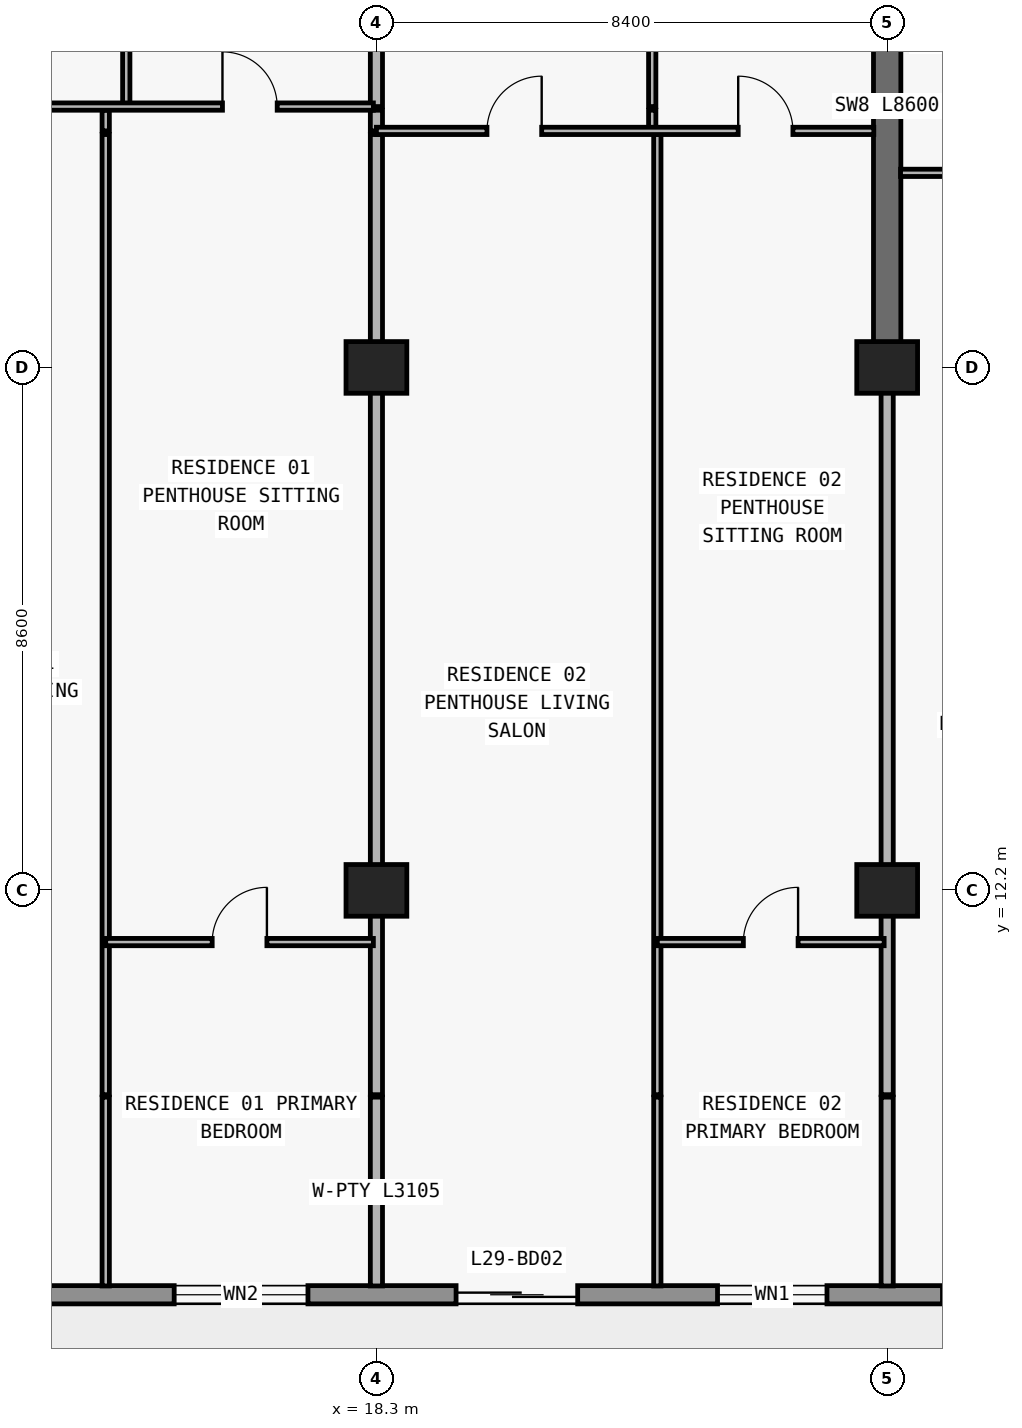
"""IFC4 building model, lengths in metres.
Left out: names, types, materials, properties, quantities, classifications, styles, units other than length and angle.
Written with IfcOpenShell. Run it as: python <this file> out.ifc"""

import sys

from ifc_helpers import new_model, si_unit, direction, frame, frame_2d, origin, origin_2d, place, context, subcontext, project, spatial, rectangle, extrude, element, fill, save


model = new_model("IFC4")
c1 = context("Model", 3, precision=1e-05, world=origin(), true_north=direction((0.0, 1.0)))
c2 = subcontext(c1, "Body", "Model", "MODEL_VIEW")
j1 = project(units=[si_unit("LENGTHUNIT", "METRE"), si_unit("PLANEANGLEUNIT", "RADIAN")], contexts=[c1])
p1 = place(None, origin())
s1 = spatial("IfcSite", under=j1, at=p1, CompositionType="ELEMENT")
p2 = place(p1, origin())
s2 = spatial("IfcBuilding", under=s1, at=p2, CompositionType="ELEMENT")
p3 = place(p2, frame((0.0, 0.0, 109.2)))
s3 = spatial("IfcBuildingStorey", under=s2, at=p3, CompositionType="ELEMENT", Elevation=109.2)
for number, where, z_axis, x_axis in (
    (1, (18.3, 12.2, 0.0), (0.0, 0.0, 1.0), (1.0, 0.0, 0.0)),
    (2, (26.7, 12.2, 0.0), (0.0, 0.0, 1.0), (1.0, 0.0, 0.0)),
    (3, (18.3, 20.8, 0.0), (0.0, 0.0, 1.0), (1.0, 0.0, 0.0)),
    (4, (26.7, 20.8, 0.0), (0.0, 0.0, 1.0), (1.0, 0.0, 0.0)),
):
    element("IfcColumn", number, at=place(p3, frame(where, z_axis=z_axis, x_axis=x_axis)), inside=s3, PredefinedType="COLUMN", context=c2, shape_type="SweptSolid", body=[
        extrude(rectangle(XDim=1.0, YDim=0.85, at=origin_2d()), origin(), (0.0, 0.0, 1.0), 3.05),
    ])
p4 = place(p3, frame((26.7, 20.8, 0.0), z_axis=(0.0, 0.0, 1.0), x_axis=(0.0, 1.0, 0.0)))
e5 = element("IfcWall", 5, at=p4, inside=s3, PredefinedType="SHEAR", context=c2, shape_type="SweptSolid", body=[
    extrude(rectangle(XDim=8.6, YDim=0.45, at=frame_2d((4.3, 0.0))), origin(), (0.0, 0.0, 1.0), 3.05),
])
p5 = place(p3, frame((70.1, 5.55, 0.0), z_axis=(0.0, 0.0, 1.0), x_axis=(-1.0, 0.0, 0.0)))
e6 = element("IfcWall", 6, at=p5, inside=s3, PredefinedType="STANDARD", context=c2, shape_type="SweptSolid", body=[
    extrude(rectangle(XDim=62.4, YDim=0.3, at=frame_2d((31.2, 0.0))), origin(), (0.0, 0.0, 1.0), 3.05),
])
p6 = place(p5, frame((57.226, 0.0, 0.0)))
e7 = element("IfcOpeningElement", 7, at=p6, cuts=e6, PredefinedType="OPENING", context=c2, shape_type="SweptSolid", body=[
    extrude(rectangle(XDim=2.0, YDim=2.3, at=frame_2d((1.0, 1.15))), frame((0.0, 0.16, 0.0), z_axis=(0.0, -1.0, 0.0), x_axis=(1.0, 0.0, 0.0)), (0.0, 0.0, 1.0), 0.32),
])
p7 = place(p5, frame((52.926, 0.0, 0.85)))
e8 = element("IfcOpeningElement", 8, at=p7, cuts=e6, PredefinedType="OPENING", context=c2, shape_type="SweptSolid", body=[
    extrude(rectangle(XDim=2.2, YDim=1.55, at=frame_2d((1.1, 0.775))), frame((0.0, 0.16, 0.0), z_axis=(0.0, -1.0, 0.0), x_axis=(1.0, 0.0, 0.0)), (0.0, 0.0, 1.0), 0.32),
])
p8 = place(p5, frame((48.49, 0.0, 0.0)))
e9 = element("IfcOpeningElement", 9, at=p8, cuts=e6, PredefinedType="OPENING", context=c2, shape_type="SweptSolid", body=[
    extrude(rectangle(XDim=2.0, YDim=2.3, at=frame_2d((1.0, 1.15))), frame((0.0, 0.16, 0.0), z_axis=(0.0, -1.0, 0.0), x_axis=(1.0, 0.0, 0.0)), (0.0, 0.0, 1.0), 0.32),
])
p9 = place(p5, frame((44.39, 0.0, 0.85)))
e10 = element("IfcOpeningElement", 10, at=p9, cuts=e6, PredefinedType="OPENING", context=c2, shape_type="SweptSolid", body=[
    extrude(rectangle(XDim=1.8, YDim=1.55, at=frame_2d((0.9, 0.775))), frame((0.0, 0.16, 0.0), z_axis=(0.0, -1.0, 0.0), x_axis=(1.0, 0.0, 0.0)), (0.0, 0.0, 1.0), 0.32),
])
p10 = place(p5, frame((40.49, 0.0, 0.0)))
e11 = element("IfcOpeningElement", 11, at=p10, cuts=e6, PredefinedType="OPENING", context=c2, shape_type="SweptSolid", body=[
    extrude(rectangle(XDim=2.0, YDim=2.3, at=frame_2d((1.0, 1.15))), frame((0.0, 0.16, 0.0), z_axis=(0.0, -1.0, 0.0), x_axis=(1.0, 0.0, 0.0)), (0.0, 0.0, 1.0), 0.32),
])
p11 = place(p5, frame((35.81, 0.0, 0.65)))
e12 = element("IfcOpeningElement", 12, at=p11, cuts=e6, PredefinedType="OPENING", context=c2, shape_type="SweptSolid", body=[
    extrude(rectangle(XDim=2.6, YDim=1.85, at=frame_2d((1.3, 0.925))), frame((0.0, 0.16, 0.0), z_axis=(0.0, -1.0, 0.0), x_axis=(1.0, 0.0, 0.0)), (0.0, 0.0, 1.0), 0.32),
])
p12 = place(p5, frame((30.1, 0.0, 0.85)))
e13 = element("IfcOpeningElement", 13, at=p12, cuts=e6, PredefinedType="OPENING", context=c2, shape_type="SweptSolid", body=[
    extrude(rectangle(XDim=2.2, YDim=1.55, at=frame_2d((1.1, 0.775))), frame((0.0, 0.16, 0.0), z_axis=(0.0, -1.0, 0.0), x_axis=(1.0, 0.0, 0.0)), (0.0, 0.0, 1.0), 0.32),
])
p13 = place(p5, frame((22.1, 0.0, 0.85)))
e14 = element("IfcOpeningElement", 14, at=p13, cuts=e6, PredefinedType="OPENING", context=c2, shape_type="SweptSolid", body=[
    extrude(rectangle(XDim=2.2, YDim=1.55, at=frame_2d((1.1, 0.775))), frame((0.0, 0.16, 0.0), z_axis=(0.0, -1.0, 0.0), x_axis=(1.0, 0.0, 0.0)), (0.0, 0.0, 1.0), 0.32),
])
p14 = place(p5, frame((15.69, 0.0, 0.0)))
e15 = element("IfcOpeningElement", 15, at=p14, cuts=e6, PredefinedType="OPENING", context=c2, shape_type="SweptSolid", body=[
    extrude(rectangle(XDim=2.0, YDim=2.3, at=frame_2d((1.0, 1.15))), frame((0.0, 0.16, 0.0), z_axis=(0.0, -1.0, 0.0), x_axis=(1.0, 0.0, 0.0)), (0.0, 0.0, 1.0), 0.32),
])
p15 = place(p5, frame((11.59, 0.0, 0.85)))
e16 = element("IfcOpeningElement", 16, at=p15, cuts=e6, PredefinedType="OPENING", context=c2, shape_type="SweptSolid", body=[
    extrude(rectangle(XDim=1.8, YDim=1.55, at=frame_2d((0.9, 0.775))), frame((0.0, 0.16, 0.0), z_axis=(0.0, -1.0, 0.0), x_axis=(1.0, 0.0, 0.0)), (0.0, 0.0, 1.0), 0.32),
])
p16 = place(p5, frame((7.626, 0.0, 0.0)))
e17 = element("IfcOpeningElement", 17, at=p16, cuts=e6, PredefinedType="OPENING", context=c2, shape_type="SweptSolid", body=[
    extrude(rectangle(XDim=2.0, YDim=2.3, at=frame_2d((1.0, 1.15))), frame((0.0, 0.16, 0.0), z_axis=(0.0, -1.0, 0.0), x_axis=(1.0, 0.0, 0.0)), (0.0, 0.0, 1.0), 0.32),
])
p17 = place(p5, frame((3.326, 0.0, 0.85)))
e18 = element("IfcOpeningElement", 18, at=p17, cuts=e6, PredefinedType="OPENING", context=c2, shape_type="SweptSolid", body=[
    extrude(rectangle(XDim=2.2, YDim=1.55, at=frame_2d((1.1, 0.775))), frame((0.0, 0.16, 0.0), z_axis=(0.0, -1.0, 0.0), x_axis=(1.0, 0.0, 0.0)), (0.0, 0.0, 1.0), 0.32),
])
p18 = place(p3, frame((13.848, 5.695, 0.0), z_axis=(0.0, 0.0, 1.0), x_axis=(0.0, 1.0, 0.0)))
e19 = element("IfcWall", 19, at=p18, inside=s3, PredefinedType="PARTITIONING", context=c2, shape_type="SweptSolid", body=[
    extrude(rectangle(XDim=3.105, YDim=0.12, at=frame_2d((1.552, 0.0))), origin(), (0.0, 0.0, 1.0), 3.05),
])
p19 = place(p3, frame((13.848, 8.84, 0.0), z_axis=(0.0, 0.0, 1.0), x_axis=(0.0, 1.0, 0.0)))
e20 = element("IfcWall", 20, at=p19, inside=s3, PredefinedType="PARTITIONING", context=c2, shape_type="SweptSolid", body=[
    extrude(rectangle(XDim=15.79, YDim=0.12, at=frame_2d((7.895, 0.0))), origin(), (0.0, 0.0, 1.0), 3.05),
])
p20 = place(p3, frame((13.848, 24.69, 0.0), z_axis=(0.0, 0.0, 1.0), x_axis=(0.0, 1.0, 0.0)))
e21 = element("IfcWall", 21, at=p20, inside=s3, PredefinedType="PARTITIONING", context=c2, shape_type="SweptSolid", body=[
    extrude(rectangle(XDim=0.34, YDim=0.12, at=frame_2d((0.17, 0.0))), origin(), (0.0, 0.0, 1.0), 3.05),
])
p21 = place(p3, frame((14.186, 25.09, 0.0), z_axis=(0.0, 0.0, 1.0), x_axis=(0.0, 1.0, 0.0)))
e22 = element("IfcWall", 22, at=p21, inside=s3, PredefinedType="PARTITIONING", context=c2, shape_type="SweptSolid", body=[
    extrude(rectangle(XDim=4.69, YDim=0.12, at=frame_2d((2.345, 0.0))), origin(), (0.0, 0.0, 1.0), 2.486),
])
p22 = place(p21, frame((1.895, 0.0, 0.0)))
e23 = element("IfcOpeningElement", 23, at=p22, cuts=e22, PredefinedType="OPENING", context=c2, shape_type="SweptSolid", body=[
    extrude(rectangle(XDim=0.9, YDim=2.15, at=frame_2d((0.45, 1.075))), frame((0.0, 0.07, 0.0), z_axis=(0.0, -1.0, 0.0), x_axis=(1.0, 0.0, 0.0)), (0.0, 0.0, 1.0), 0.14),
])
p23 = place(p3, frame((18.3, 5.695, 0.0), z_axis=(0.0, 0.0, 1.0), x_axis=(0.0, 1.0, 0.0)))
e24 = element("IfcWall", 24, at=p23, inside=s3, PredefinedType="PARTITIONING", context=c2, shape_type="SweptSolid", body=[
    extrude(rectangle(XDim=3.105, YDim=0.2, at=frame_2d((1.552, 0.0))), origin(), (0.0, 0.0, 1.0), 3.05),
])
p24 = place(p3, frame((18.3, 8.84, 0.0), z_axis=(0.0, 0.0, 1.0), x_axis=(0.0, 1.0, 0.0)))
e25 = element("IfcWall", 25, at=p24, inside=s3, PredefinedType="PARTITIONING", context=c2, shape_type="SweptSolid", body=[
    extrude(rectangle(XDim=15.79, YDim=0.2, at=frame_2d((7.895, 0.0))), origin(), (0.0, 0.0, 1.0), 2.174),
])
p25 = place(p3, frame((18.3, 24.69, 0.0), z_axis=(0.0, 0.0, 1.0), x_axis=(0.0, 1.0, 0.0)))
e26 = element("IfcWall", 26, at=p25, inside=s3, PredefinedType="PARTITIONING", context=c2, shape_type="SweptSolid", body=[
    extrude(rectangle(XDim=0.34, YDim=0.2, at=frame_2d((0.17, 0.0))), origin(), (0.0, 0.0, 1.0), 2.174),
])
p26 = place(p3, frame((18.3, 25.09, 0.0), z_axis=(0.0, 0.0, 1.0), x_axis=(0.0, 1.0, 0.0)))
e27 = element("IfcWall", 27, at=p26, inside=s3, PredefinedType="PARTITIONING", context=c2, shape_type="SweptSolid", body=[
    extrude(rectangle(XDim=4.69, YDim=0.2, at=frame_2d((2.345, 0.0))), origin(), (0.0, 0.0, 1.0), 2.174),
])
p27 = place(p3, frame((22.836, 24.69, 0.0), z_axis=(0.0, 0.0, 1.0), x_axis=(0.0, 1.0, 0.0)))
e28 = element("IfcWall", 28, at=p27, inside=s3, PredefinedType="PARTITIONING", context=c2, shape_type="SweptSolid", body=[
    extrude(rectangle(XDim=0.34, YDim=0.12, at=frame_2d((0.17, 0.0))), origin(), (0.0, 0.0, 1.0), 3.05),
])
p28 = place(p3, frame((22.836, 25.09, 0.0), z_axis=(0.0, 0.0, 1.0), x_axis=(0.0, 1.0, 0.0)))
e29 = element("IfcWall", 29, at=p28, inside=s3, PredefinedType="PARTITIONING", context=c2, shape_type="SweptSolid", body=[
    extrude(rectangle(XDim=4.69, YDim=0.12, at=frame_2d((2.345, 0.0))), origin(), (0.0, 0.0, 1.0), 3.05),
])
p29 = place(p28, frame((1.895, 0.0, 0.0)))
e30 = element("IfcOpeningElement", 30, at=p29, cuts=e29, PredefinedType="OPENING", context=c2, shape_type="SweptSolid", body=[
    extrude(rectangle(XDim=0.9, YDim=2.15, at=frame_2d((0.45, 1.075))), frame((0.0, 0.07, 0.0), z_axis=(0.0, -1.0, 0.0), x_axis=(1.0, 0.0, 0.0)), (0.0, 0.0, 1.0), 0.14),
])
p30 = place(p3, frame((22.92, 5.695, 0.0), z_axis=(0.0, 0.0, 1.0), x_axis=(0.0, 1.0, 0.0)))
e31 = element("IfcWall", 31, at=p30, inside=s3, PredefinedType="PARTITIONING", context=c2, shape_type="SweptSolid", body=[
    extrude(rectangle(XDim=3.105, YDim=0.12, at=frame_2d((1.552, 0.0))), origin(), (0.0, 0.0, 1.0), 3.05),
])
p31 = place(p3, frame((22.92, 8.84, 0.0), z_axis=(0.0, 0.0, 1.0), x_axis=(0.0, 1.0, 0.0)))
e32 = element("IfcWall", 32, at=p31, inside=s3, PredefinedType="PARTITIONING", context=c2, shape_type="SweptSolid", body=[
    extrude(rectangle(XDim=15.79, YDim=0.12, at=frame_2d((7.895, 0.0))), origin(), (0.0, 0.0, 1.0), 3.05),
])
p32 = place(p3, frame((26.7, 5.695, 0.0), z_axis=(0.0, 0.0, 1.0), x_axis=(0.0, 1.0, 0.0)))
e33 = element("IfcWall", 33, at=p32, inside=s3, PredefinedType="PARTITIONING", context=c2, shape_type="SweptSolid", body=[
    extrude(rectangle(XDim=3.105, YDim=0.2, at=frame_2d((1.552, 0.0))), origin(), (0.0, 0.0, 1.0), 3.05),
])
p33 = place(p3, frame((26.7, 8.84, 0.0), z_axis=(0.0, 0.0, 1.0), x_axis=(0.0, 1.0, 0.0)))
e34 = element("IfcWall", 34, at=p33, inside=s3, PredefinedType="PARTITIONING", context=c2, shape_type="SweptSolid", body=[
    extrude(rectangle(XDim=11.955, YDim=0.2, at=frame_2d((5.978, 0.0))), origin(), (0.0, 0.0, 1.0), 2.174),
])
p34 = place(p3, frame((13.848, 11.35, 0.0), z_axis=(0.0, 0.0, 1.0), x_axis=(1.0, 0.0, 0.0)))
e35 = element("IfcWall", 35, at=p34, inside=s3, PredefinedType="PARTITIONING", context=c2, shape_type="SweptSolid", body=[
    extrude(rectangle(XDim=4.402, YDim=0.12, at=frame_2d((2.201, 0.0))), origin(), (0.0, 0.0, 1.0), 3.05),
])
p35 = place(p34, frame((1.751, 0.0, 0.0)))
e36 = element("IfcOpeningElement", 36, at=p35, cuts=e35, PredefinedType="OPENING", context=c2, shape_type="SweptSolid", body=[
    extrude(rectangle(XDim=0.9, YDim=2.15, at=frame_2d((0.45, 1.075))), frame((0.0, 0.07, 0.0), z_axis=(0.0, -1.0, 0.0), x_axis=(1.0, 0.0, 0.0)), (0.0, 0.0, 1.0), 0.14),
])
p36 = place(p3, frame((22.92, 11.35, 0.0), z_axis=(0.0, 0.0, 1.0), x_axis=(1.0, 0.0, 0.0)))
e37 = element("IfcWall", 37, at=p36, inside=s3, PredefinedType="PARTITIONING", context=c2, shape_type="SweptSolid", body=[
    extrude(rectangle(XDim=3.73, YDim=0.12, at=frame_2d((1.865, 0.0))), origin(), (0.0, 0.0, 1.0), 3.05),
])
p37 = place(p36, frame((1.415, 0.0, 0.0)))
e38 = element("IfcOpeningElement", 38, at=p37, cuts=e37, PredefinedType="OPENING", context=c2, shape_type="SweptSolid", body=[
    extrude(rectangle(XDim=0.9, YDim=2.15, at=frame_2d((0.45, 1.075))), frame((0.0, 0.07, 0.0), z_axis=(0.0, -1.0, 0.0), x_axis=(1.0, 0.0, 0.0)), (0.0, 0.0, 1.0), 0.14),
])
p38 = place(p3, frame((26.92, 24.0, 0.0), z_axis=(0.0, 0.0, 1.0), x_axis=(1.0, 0.0, 0.0)))
e39 = element("IfcWall", 39, at=p38, inside=s3, PredefinedType="PARTITIONING", context=c2, shape_type="SweptSolid", body=[
    extrude(rectangle(XDim=8.18, YDim=0.12, at=frame_2d((4.09, 0.0))), origin(), (0.0, 0.0, 1.0), 3.05),
])
p39 = place(p38, frame((1.33, 0.0, 0.0)))
e40 = element("IfcOpeningElement", 40, at=p39, cuts=e39, PredefinedType="OPENING", context=c2, shape_type="SweptSolid", body=[
    extrude(rectangle(XDim=0.9, YDim=2.15, at=frame_2d((0.45, 1.075))), frame((0.0, 0.07, 0.0), z_axis=(0.0, -1.0, 0.0), x_axis=(1.0, 0.0, 0.0)), (0.0, 0.0, 1.0), 0.14),
])
p40 = place(p3, frame((18.3, 24.69, 0.0), z_axis=(0.0, 0.0, 1.0), x_axis=(1.0, 0.0, 0.0)))
e41 = element("IfcWall", 41, at=p40, inside=s3, PredefinedType="PARTITIONING", context=c2, shape_type="SweptSolid", body=[
    extrude(rectangle(XDim=8.18, YDim=0.12, at=frame_2d((4.09, 0.0))), origin(), (0.0, 0.0, 1.0), 3.05),
])
p41 = place(p40, frame((1.818, 0.0, 0.0)))
e42 = element("IfcOpeningElement", 42, at=p41, cuts=e41, PredefinedType="OPENING", context=c2, shape_type="SweptSolid", body=[
    extrude(rectangle(XDim=0.9, YDim=2.15, at=frame_2d((0.45, 1.075))), frame((0.0, 0.07, 0.0), z_axis=(0.0, -1.0, 0.0), x_axis=(1.0, 0.0, 0.0)), (0.0, 0.0, 1.0), 0.14),
])
p42 = place(p40, frame((5.95, 0.0, 0.0)))
e43 = element("IfcOpeningElement", 43, at=p42, cuts=e41, PredefinedType="OPENING", context=c2, shape_type="SweptSolid", body=[
    extrude(rectangle(XDim=0.9, YDim=2.15, at=frame_2d((0.45, 1.075))), frame((0.0, 0.07, 0.0), z_axis=(0.0, -1.0, 0.0), x_axis=(1.0, 0.0, 0.0)), (0.0, 0.0, 1.0), 0.14),
])
p43 = place(p3, frame((9.9, 25.09, 0.0), z_axis=(0.0, 0.0, 1.0), x_axis=(1.0, 0.0, 0.0)))
e44 = element("IfcWall", 44, at=p43, inside=s3, PredefinedType="PARTITIONING", context=c2, shape_type="SweptSolid", body=[
    extrude(rectangle(XDim=8.35, YDim=0.12, at=frame_2d((4.175, 0.0))), origin(), (0.0, 0.0, 1.0), 3.05),
])
p44 = place(p43, frame((1.524, 0.0, 0.0)))
e45 = element("IfcOpeningElement", 45, at=p44, cuts=e44, PredefinedType="OPENING", context=c2, shape_type="SweptSolid", body=[
    extrude(rectangle(XDim=0.9, YDim=2.15, at=frame_2d((0.45, 1.075))), frame((0.0, 0.07, 0.0), z_axis=(0.0, -1.0, 0.0), x_axis=(1.0, 0.0, 0.0)), (0.0, 0.0, 1.0), 0.14),
])
p45 = place(p43, frame((5.868, 0.0, 0.0)))
e46 = element("IfcOpeningElement", 46, at=p45, cuts=e44, PredefinedType="OPENING", context=c2, shape_type="SweptSolid", body=[
    extrude(rectangle(XDim=0.9, YDim=2.15, at=frame_2d((0.45, 1.075))), frame((0.0, 0.07, 0.0), z_axis=(0.0, -1.0, 0.0), x_axis=(1.0, 0.0, 0.0)), (0.0, 0.0, 1.0), 0.14),
])
p46 = place(p7, origin())
e47 = element("IfcWindow", 47, at=p46, inside=s3, PartitioningType="SINGLE_PANEL", PredefinedType="WINDOW", context=c2, shape_type="SweptSolid", body=[
    extrude(rectangle(XDim=2.2, YDim=1.55, at=frame_2d((1.1, 0.775))), frame((0.0, 0.03, 0.0), z_axis=(0.0, -1.0, 0.0), x_axis=(1.0, 0.0, 0.0)), (0.0, 0.0, 1.0), 0.06),
])
fill(e8, e47)
p47 = place(p8, origin())
e48 = element("IfcDoor", 48, at=p47, inside=s3, OperationType="DOUBLE_DOOR_SLIDING", PredefinedType="DOOR", context=c2, shape_type="SweptSolid", body=[
    extrude(rectangle(XDim=2.0, YDim=2.3, at=frame_2d((1.0, 1.15))), frame((0.0, 0.025, 0.0), z_axis=(0.0, -1.0, 0.0), x_axis=(1.0, 0.0, 0.0)), (0.0, 0.0, 1.0), 0.05),
])
fill(e9, e48)
p48 = place(p9, origin())
e49 = element("IfcWindow", 49, at=p48, inside=s3, PartitioningType="SINGLE_PANEL", PredefinedType="WINDOW", context=c2, shape_type="SweptSolid", body=[
    extrude(rectangle(XDim=1.8, YDim=1.55, at=frame_2d((0.9, 0.775))), frame((0.0, 0.03, 0.0), z_axis=(0.0, -1.0, 0.0), x_axis=(1.0, 0.0, 0.0)), (0.0, 0.0, 1.0), 0.06),
])
fill(e10, e49)
p49 = place(p45, origin())
e50 = element("IfcDoor", 50, at=p49, inside=s3, OperationType="SINGLE_SWING_LEFT", PredefinedType="DOOR", context=c2, shape_type="SweptSolid", body=[
    extrude(rectangle(XDim=0.9, YDim=2.15, at=frame_2d((0.45, 1.075))), frame((0.0, 0.025, 0.0), z_axis=(0.0, -1.0, 0.0), x_axis=(1.0, 0.0, 0.0)), (0.0, 0.0, 1.0), 0.05),
])
fill(e46, e50)
p50 = place(p35, origin())
e51 = element("IfcDoor", 51, at=p50, inside=s3, OperationType="SINGLE_SWING_RIGHT", PredefinedType="DOOR", context=c2, shape_type="SweptSolid", body=[
    extrude(rectangle(XDim=0.9, YDim=2.15, at=frame_2d((0.45, 1.075))), frame((0.0, 0.025, 0.0), z_axis=(0.0, -1.0, 0.0), x_axis=(1.0, 0.0, 0.0)), (0.0, 0.0, 1.0), 0.05),
])
fill(e36, e51)
p51 = place(p41, origin())
e52 = element("IfcDoor", 52, at=p51, inside=s3, OperationType="SINGLE_SWING_RIGHT", PredefinedType="DOOR", context=c2, shape_type="SweptSolid", body=[
    extrude(rectangle(XDim=0.9, YDim=2.15, at=frame_2d((0.45, 1.075))), frame((0.0, 0.025, 0.0), z_axis=(0.0, -1.0, 0.0), x_axis=(1.0, 0.0, 0.0)), (0.0, 0.0, 1.0), 0.05),
])
fill(e42, e52)
p52 = place(p42, origin())
e53 = element("IfcDoor", 53, at=p52, inside=s3, OperationType="SINGLE_SWING_LEFT", PredefinedType="DOOR", context=c2, shape_type="SweptSolid", body=[
    extrude(rectangle(XDim=0.9, YDim=2.15, at=frame_2d((0.45, 1.075))), frame((0.0, 0.025, 0.0), z_axis=(0.0, -1.0, 0.0), x_axis=(1.0, 0.0, 0.0)), (0.0, 0.0, 1.0), 0.05),
])
fill(e43, e53)
p53 = place(p37, origin())
e54 = element("IfcDoor", 54, at=p53, inside=s3, OperationType="SINGLE_SWING_RIGHT", PredefinedType="DOOR", context=c2, shape_type="SweptSolid", body=[
    extrude(rectangle(XDim=0.9, YDim=2.15, at=frame_2d((0.45, 1.075))), frame((0.0, 0.025, 0.0), z_axis=(0.0, -1.0, 0.0), x_axis=(1.0, 0.0, 0.0)), (0.0, 0.0, 1.0), 0.05),
])
fill(e38, e54)
save(model, sys.argv[1])
